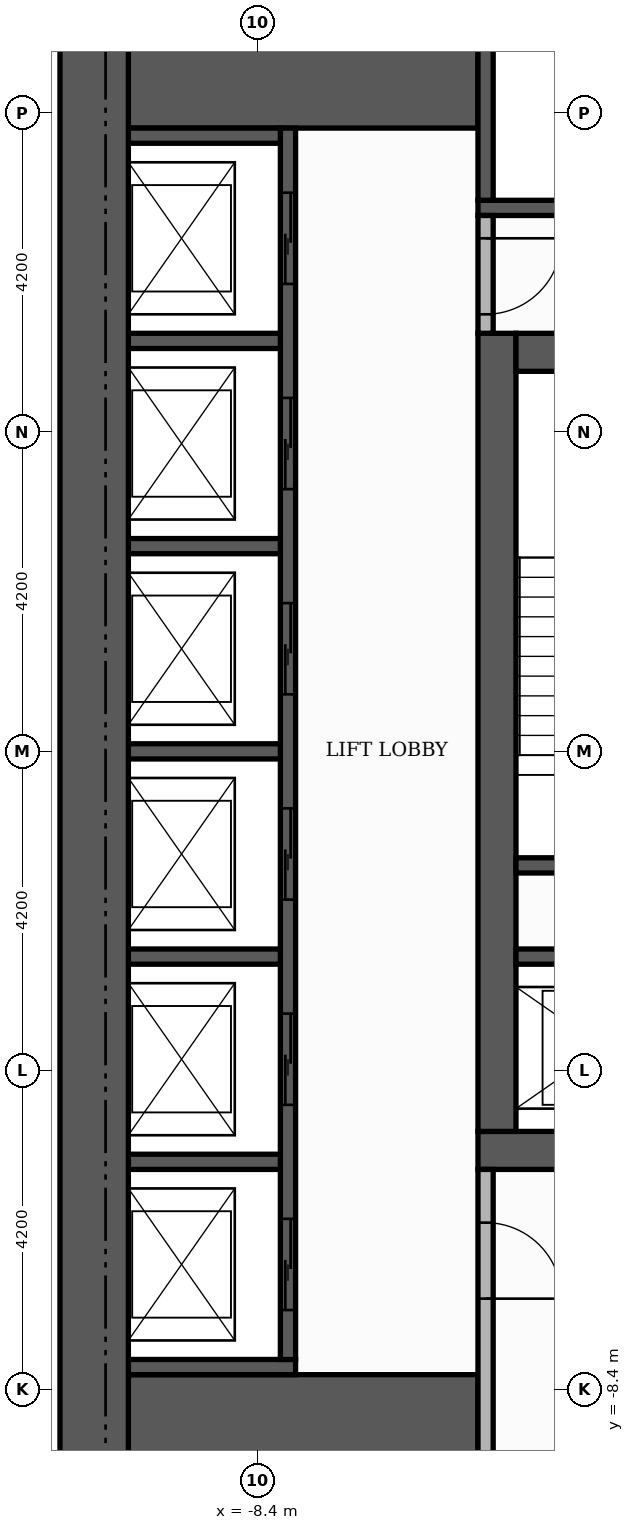
"""IFC4 building model, lengths in metres.
Left out: names, types, materials, properties, quantities, classifications, styles, units other than length and angle.
Written with IfcOpenShell. Run it as: python <this file> out.ifc"""

import sys

from ifc_helpers import new_model, si_unit, direction, frame, frame_2d, origin, place, context, subcontext, project, spatial, rectangle, extrude, element, fill, save


model = new_model("IFC4")
c1 = context("Model", 3, precision=1e-05, world=origin(), true_north=direction((0.0, 1.0)))
c2 = subcontext(c1, "Body", "Model", "MODEL_VIEW")
j1 = project(units=[si_unit("LENGTHUNIT", "METRE"), si_unit("PLANEANGLEUNIT", "RADIAN")], contexts=[c1])
p1 = place(None, origin())
s1 = spatial("IfcSite", under=j1, at=p1, CompositionType="ELEMENT")
p2 = place(p1, origin())
s2 = spatial("IfcBuilding", under=s1, at=p2, CompositionType="ELEMENT")
p3 = place(p2, frame((0.0, 0.0, 102.6)))
s3 = spatial("IfcBuildingStorey", under=s2, at=p3, CompositionType="ELEMENT", Elevation=102.6)
p4 = place(p3, frame((-5.5, -5.25, 0.0), z_axis=(0.0, 0.0, 1.0), x_axis=(1.0, 0.0, 0.0)))
e1 = element("IfcWall", 1, at=p4, inside=s3, PredefinedType="SHEAR", context=c2, shape_type="SweptSolid", body=[
    extrude(rectangle(XDim=11.0, YDim=0.5, at=frame_2d((5.5, 0.0))), origin(), (0.0, 0.0, 1.0), 3.48),
])
p5 = place(p4, frame((4.9, 0.0, 0.0)))
e2 = element("IfcOpeningElement", 2, at=p5, cuts=e1, PredefinedType="OPENING", context=c2, shape_type="SweptSolid", body=[
    extrude(rectangle(XDim=1.2, YDim=2.1, at=frame_2d((0.6, 1.05))), frame((0.0, 0.26, 0.0), z_axis=(0.0, -1.0, 0.0), x_axis=(1.0, 0.0, 0.0)), (0.0, 0.0, 1.0), 0.52),
])
p6 = place(p3, frame((-5.25, -5.0, 0.0), z_axis=(0.0, 0.0, 1.0), x_axis=(0.0, 1.0, 0.0)))
e3 = element("IfcWall", 3, at=p6, inside=s3, PredefinedType="SHEAR", context=c2, shape_type="SweptSolid", body=[
    extrude(rectangle(XDim=10.5, YDim=0.5, at=frame_2d((5.25, 0.0))), origin(), (0.0, 0.0, 1.0), 3.48),
])
p7 = place(p3, frame((-5.0, 5.25, 0.0), z_axis=(0.0, 0.0, 1.0), x_axis=(1.0, 0.0, 0.0)))
e4 = element("IfcWall", 4, at=p7, inside=s3, PredefinedType="SHEAR", context=c2, shape_type="SweptSolid", body=[
    extrude(rectangle(XDim=10.0, YDim=0.5, at=frame_2d((5.0, 0.0))), origin(), (0.0, 0.0, 1.0), 3.48),
])
p8 = place(p7, frame((4.4, 0.0, 0.0)))
e5 = element("IfcOpeningElement", 5, at=p8, cuts=e4, PredefinedType="OPENING", context=c2, shape_type="SweptSolid", body=[
    extrude(rectangle(XDim=1.2, YDim=2.1, at=frame_2d((0.6, 1.05))), frame((0.0, 0.26, 0.0), z_axis=(0.0, -1.0, 0.0), x_axis=(1.0, 0.0, 0.0)), (0.0, 0.0, 1.0), 0.52),
])
for number, where, z_axis, x_axis in (
    (6, (-10.1, -9.15, 0.0), (0.0, 0.0, 1.0), (1.0, 0.0, 0.0)),
    (7, (-10.1, 9.15, 0.0), (0.0, 0.0, 1.0), (1.0, 0.0, 0.0)),
):
    element("IfcWall", number, at=place(p3, frame(where, z_axis=z_axis, x_axis=x_axis)), inside=s3, PredefinedType="SHEAR", context=c2, shape_type="SweptSolid", body=[
        extrude(rectangle(XDim=4.6, YDim=1.9, at=frame_2d((2.3, 0.0))), origin(), (0.0, 0.0, 1.0), 3.48),
    ])
p9 = place(p3, frame((-5.0, -1.5, 0.0), z_axis=(0.0, 0.0, 1.0), x_axis=(1.0, 0.0, 0.0)))
e8 = element("IfcWall", 8, at=p9, inside=s3, PredefinedType="SHEAR", context=c2, shape_type="SweptSolid", body=[
    extrude(rectangle(XDim=3.05, YDim=0.2, at=frame_2d((1.525, 0.0))), origin(), (0.0, 0.0, 1.0), 3.48),
])
p10 = place(p3, frame((-5.5, 7.15, 0.0), z_axis=(0.0, 0.0, 1.0), x_axis=(1.0, 0.0, 0.0)))
e9 = element("IfcWall", 9, at=p10, inside=s3, PredefinedType="SHEAR", context=c2, shape_type="SweptSolid", body=[
    extrude(rectangle(XDim=6.8, YDim=0.2, at=frame_2d((3.4, 0.0))), origin(), (0.0, 0.0, 1.0), 3.48),
])
p11 = place(p3, frame((-5.4, 7.25, 0.0), z_axis=(0.0, 0.0, 1.0), x_axis=(0.0, 1.0, 0.0)))
e10 = element("IfcWall", 10, at=p11, inside=s3, PredefinedType="SHEAR", context=c2, shape_type="SweptSolid", body=[
    extrude(rectangle(XDim=2.85, YDim=0.2, at=frame_2d((1.425, 0.0))), origin(), (0.0, 0.0, 1.0), 3.48),
])
p12 = place(p3, frame((-10.1, -8.1, 0.0), z_axis=(0.0, 0.0, 1.0), x_axis=(1.0, 0.0, 0.0)))
e11 = element("IfcWall", 11, at=p12, inside=s3, PredefinedType="SHEAR", context=c2, shape_type="SweptSolid", body=[
    extrude(rectangle(XDim=2.2, YDim=0.2, at=frame_2d((1.1, 0.0))), origin(), (0.0, 0.0, 1.0), 3.48),
])
p13 = place(p3, frame((-8.0, -8.0, 0.0), z_axis=(0.0, 0.0, 1.0), x_axis=(0.0, 1.0, 0.0)))
e12 = element("IfcWall", 12, at=p13, inside=s3, PredefinedType="SHEAR", context=c2, shape_type="SweptSolid", body=[
    extrude(rectangle(XDim=16.2, YDim=0.2, at=frame_2d((8.1, 0.0))), origin(), (0.0, 0.0, 1.0), 3.48),
])
p14 = place(p13, frame((0.65, 0.0, 0.0)))
e13 = element("IfcOpeningElement", 13, at=p14, cuts=e12, PredefinedType="OPENING", context=c2, shape_type="SweptSolid", body=[
    extrude(rectangle(XDim=1.2, YDim=2.1, at=frame_2d((0.6, 1.05))), frame((0.0, 0.11, 0.0), z_axis=(0.0, -1.0, 0.0), x_axis=(1.0, 0.0, 0.0)), (0.0, 0.0, 1.0), 0.22),
])
p15 = place(p13, frame((3.35, 0.0, 0.0)))
e14 = element("IfcOpeningElement", 14, at=p15, cuts=e12, PredefinedType="OPENING", context=c2, shape_type="SweptSolid", body=[
    extrude(rectangle(XDim=1.2, YDim=2.1, at=frame_2d((0.6, 1.05))), frame((0.0, 0.11, 0.0), z_axis=(0.0, -1.0, 0.0), x_axis=(1.0, 0.0, 0.0)), (0.0, 0.0, 1.0), 0.22),
])
p16 = place(p13, frame((6.05, 0.0, 0.0)))
e15 = element("IfcOpeningElement", 15, at=p16, cuts=e12, PredefinedType="OPENING", context=c2, shape_type="SweptSolid", body=[
    extrude(rectangle(XDim=1.2, YDim=2.1, at=frame_2d((0.6, 1.05))), frame((0.0, 0.11, 0.0), z_axis=(0.0, -1.0, 0.0), x_axis=(1.0, 0.0, 0.0)), (0.0, 0.0, 1.0), 0.22),
])
p17 = place(p13, frame((8.75, 0.0, 0.0)))
e16 = element("IfcOpeningElement", 16, at=p17, cuts=e12, PredefinedType="OPENING", context=c2, shape_type="SweptSolid", body=[
    extrude(rectangle(XDim=1.2, YDim=2.1, at=frame_2d((0.6, 1.05))), frame((0.0, 0.11, 0.0), z_axis=(0.0, -1.0, 0.0), x_axis=(1.0, 0.0, 0.0)), (0.0, 0.0, 1.0), 0.22),
])
p18 = place(p13, frame((11.45, 0.0, 0.0)))
e17 = element("IfcOpeningElement", 17, at=p18, cuts=e12, PredefinedType="OPENING", context=c2, shape_type="SweptSolid", body=[
    extrude(rectangle(XDim=1.2, YDim=2.1, at=frame_2d((0.6, 1.05))), frame((0.0, 0.11, 0.0), z_axis=(0.0, -1.0, 0.0), x_axis=(1.0, 0.0, 0.0)), (0.0, 0.0, 1.0), 0.22),
])
p19 = place(p13, frame((14.15, 0.0, 0.0)))
e18 = element("IfcOpeningElement", 18, at=p19, cuts=e12, PredefinedType="OPENING", context=c2, shape_type="SweptSolid", body=[
    extrude(rectangle(XDim=1.2, YDim=2.1, at=frame_2d((0.6, 1.05))), frame((0.0, 0.11, 0.0), z_axis=(0.0, -1.0, 0.0), x_axis=(1.0, 0.0, 0.0)), (0.0, 0.0, 1.0), 0.22),
])
for number, where, z_axis, x_axis in (
    (19, (-10.1, -5.4, 0.0), (0.0, 0.0, 1.0), (1.0, 0.0, 0.0)),
    (20, (-10.1, -2.7, 0.0), (0.0, 0.0, 1.0), (1.0, 0.0, 0.0)),
):
    element("IfcWall", number, at=place(p3, frame(where, z_axis=z_axis, x_axis=x_axis)), inside=s3, PredefinedType="SHEAR", context=c2, shape_type="SweptSolid", body=[
        extrude(rectangle(XDim=2.0, YDim=0.2, at=frame_2d((1.0, 0.0))), origin(), (0.0, 0.0, 1.0), 3.48),
    ])
p20 = place(p3, frame((-5.0, -2.7, 0.0), z_axis=(0.0, 0.0, 1.0), x_axis=(1.0, 0.0, 0.0)))
e21 = element("IfcWall", 21, at=p20, inside=s3, PredefinedType="SHEAR", context=c2, shape_type="SweptSolid", body=[
    extrude(rectangle(XDim=2.85, YDim=0.2, at=frame_2d((1.425, 0.0))), origin(), (0.0, 0.0, 1.0), 3.48),
])
for number, where, z_axis, x_axis in (
    (22, (-10.1, 0.0, 0.0), (0.0, 0.0, 1.0), (1.0, 0.0, 0.0)),
    (23, (-10.1, 2.7, 0.0), (0.0, 0.0, 1.0), (1.0, 0.0, 0.0)),
    (24, (-10.1, 5.4, 0.0), (0.0, 0.0, 1.0), (1.0, 0.0, 0.0)),
    (25, (-10.1, 8.1, 0.0), (0.0, 0.0, 1.0), (1.0, 0.0, 0.0)),
):
    element("IfcWall", number, at=place(p3, frame(where, z_axis=z_axis, x_axis=x_axis)), inside=s3, PredefinedType="SHEAR", context=c2, shape_type="SweptSolid", body=[
        extrude(rectangle(XDim=2.0, YDim=0.2, at=frame_2d((1.0, 0.0))), origin(), (0.0, 0.0, 1.0), 3.48),
    ])
p21 = place(p3, frame((-10.55, -10.1, 0.0), z_axis=(0.0, 0.0, 1.0), x_axis=(0.0, 1.0, 0.0)))
e26 = element("IfcWall", 26, at=p21, inside=s3, PredefinedType="SHEAR", context=c2, shape_type="SweptSolid", body=[
    extrude(rectangle(XDim=20.2, YDim=0.9, at=frame_2d((10.1, 0.0))), origin(), (0.0, 0.0, 1.0), 3.48),
])
p22 = place(p3, frame((-5.4, -10.1, 0.0), z_axis=(0.0, 0.0, 1.0), x_axis=(0.0, 1.0, 0.0)))
e27 = element("IfcWall", 27, at=p22, inside=s3, PredefinedType="PARTITIONING", context=c2, shape_type="SweptSolid", body=[
    extrude(rectangle(XDim=4.6, YDim=0.2, at=frame_2d((2.3, 0.0))), origin(), (0.0, 0.0, 1.0), 3.48),
])
p23 = place(p22, frame((2.9, 0.0, 0.0)))
e28 = element("IfcOpeningElement", 28, at=p23, cuts=e27, PredefinedType="OPENING", context=c2, shape_type="SweptSolid", body=[
    extrude(rectangle(XDim=1.0, YDim=2.1, at=frame_2d((0.5, 1.05))), frame((0.0, 0.11, 0.0), z_axis=(0.0, -1.0, 0.0), x_axis=(1.0, 0.0, 0.0)), (0.0, 0.0, 1.0), 0.22),
])
p24 = place(p3, frame((-5.4, 5.5, 0.0), z_axis=(0.0, 0.0, 1.0), x_axis=(0.0, 1.0, 0.0)))
e29 = element("IfcWall", 29, at=p24, inside=s3, PredefinedType="PARTITIONING", context=c2, shape_type="SweptSolid", body=[
    extrude(rectangle(XDim=1.55, YDim=0.2, at=frame_2d((0.775, 0.0))), origin(), (0.0, 0.0, 1.0), 3.48),
])
p25 = place(p24, frame((0.25, 0.0, 0.0)))
e30 = element("IfcOpeningElement", 30, at=p25, cuts=e29, PredefinedType="OPENING", context=c2, shape_type="SweptSolid", body=[
    extrude(rectangle(XDim=1.0, YDim=2.1, at=frame_2d((0.5, 1.05))), frame((0.0, 0.11, 0.0), z_axis=(0.0, -1.0, 0.0), x_axis=(1.0, 0.0, 0.0)), (0.0, 0.0, 1.0), 0.22),
])
p26 = place(p14, origin())
e31 = element("IfcDoor", 31, at=p26, inside=s3, OperationType="SLIDING_TO_LEFT", PredefinedType="DOOR", context=c2, shape_type="SweptSolid", body=[
    extrude(rectangle(XDim=1.2, YDim=2.1, at=frame_2d((0.6, 1.05))), frame((0.0, 0.025, 0.0), z_axis=(0.0, -1.0, 0.0), x_axis=(1.0, 0.0, 0.0)), (0.0, 0.0, 1.0), 0.05),
])
fill(e13, e31)
p27 = place(p15, origin())
e32 = element("IfcDoor", 32, at=p27, inside=s3, OperationType="SLIDING_TO_LEFT", PredefinedType="DOOR", context=c2, shape_type="SweptSolid", body=[
    extrude(rectangle(XDim=1.2, YDim=2.1, at=frame_2d((0.6, 1.05))), frame((0.0, 0.025, 0.0), z_axis=(0.0, -1.0, 0.0), x_axis=(1.0, 0.0, 0.0)), (0.0, 0.0, 1.0), 0.05),
])
fill(e14, e32)
p28 = place(p16, origin())
e33 = element("IfcDoor", 33, at=p28, inside=s3, OperationType="SLIDING_TO_LEFT", PredefinedType="DOOR", context=c2, shape_type="SweptSolid", body=[
    extrude(rectangle(XDim=1.2, YDim=2.1, at=frame_2d((0.6, 1.05))), frame((0.0, 0.025, 0.0), z_axis=(0.0, -1.0, 0.0), x_axis=(1.0, 0.0, 0.0)), (0.0, 0.0, 1.0), 0.05),
])
fill(e15, e33)
p29 = place(p17, origin())
e34 = element("IfcDoor", 34, at=p29, inside=s3, OperationType="SLIDING_TO_LEFT", PredefinedType="DOOR", context=c2, shape_type="SweptSolid", body=[
    extrude(rectangle(XDim=1.2, YDim=2.1, at=frame_2d((0.6, 1.05))), frame((0.0, 0.025, 0.0), z_axis=(0.0, -1.0, 0.0), x_axis=(1.0, 0.0, 0.0)), (0.0, 0.0, 1.0), 0.05),
])
fill(e16, e34)
p30 = place(p18, origin())
e35 = element("IfcDoor", 35, at=p30, inside=s3, OperationType="SLIDING_TO_LEFT", PredefinedType="DOOR", context=c2, shape_type="SweptSolid", body=[
    extrude(rectangle(XDim=1.2, YDim=2.1, at=frame_2d((0.6, 1.05))), frame((0.0, 0.025, 0.0), z_axis=(0.0, -1.0, 0.0), x_axis=(1.0, 0.0, 0.0)), (0.0, 0.0, 1.0), 0.05),
])
fill(e17, e35)
p31 = place(p19, origin())
e36 = element("IfcDoor", 36, at=p31, inside=s3, OperationType="SLIDING_TO_LEFT", PredefinedType="DOOR", context=c2, shape_type="SweptSolid", body=[
    extrude(rectangle(XDim=1.2, YDim=2.1, at=frame_2d((0.6, 1.05))), frame((0.0, 0.025, 0.0), z_axis=(0.0, -1.0, 0.0), x_axis=(1.0, 0.0, 0.0)), (0.0, 0.0, 1.0), 0.05),
])
fill(e18, e36)
p32 = place(p25, frame((1.0, 0.0, 0.0), z_axis=(0.0, 0.0, 1.0), x_axis=(-1.0, 0.0, 0.0)))
e37 = element("IfcDoor", 37, at=p32, inside=s3, OperationType="SINGLE_SWING_RIGHT", PredefinedType="DOOR", context=c2, shape_type="SweptSolid", body=[
    extrude(rectangle(XDim=1.0, YDim=2.1, at=frame_2d((0.5, 1.05))), frame((0.0, 0.025, 0.0), z_axis=(0.0, -1.0, 0.0), x_axis=(1.0, 0.0, 0.0)), (0.0, 0.0, 1.0), 0.05),
])
fill(e30, e37)
p33 = place(p23, frame((1.0, 0.0, 0.0), z_axis=(0.0, 0.0, 1.0), x_axis=(-1.0, 0.0, 0.0)))
e38 = element("IfcDoor", 38, at=p33, inside=s3, OperationType="SINGLE_SWING_LEFT", PredefinedType="DOOR", context=c2, shape_type="SweptSolid", body=[
    extrude(rectangle(XDim=1.0, YDim=2.1, at=frame_2d((0.5, 1.05))), frame((0.0, 0.025, 0.0), z_axis=(0.0, -1.0, 0.0), x_axis=(1.0, 0.0, 0.0)), (0.0, 0.0, 1.0), 0.05),
])
fill(e28, e38)
save(model, sys.argv[1])
